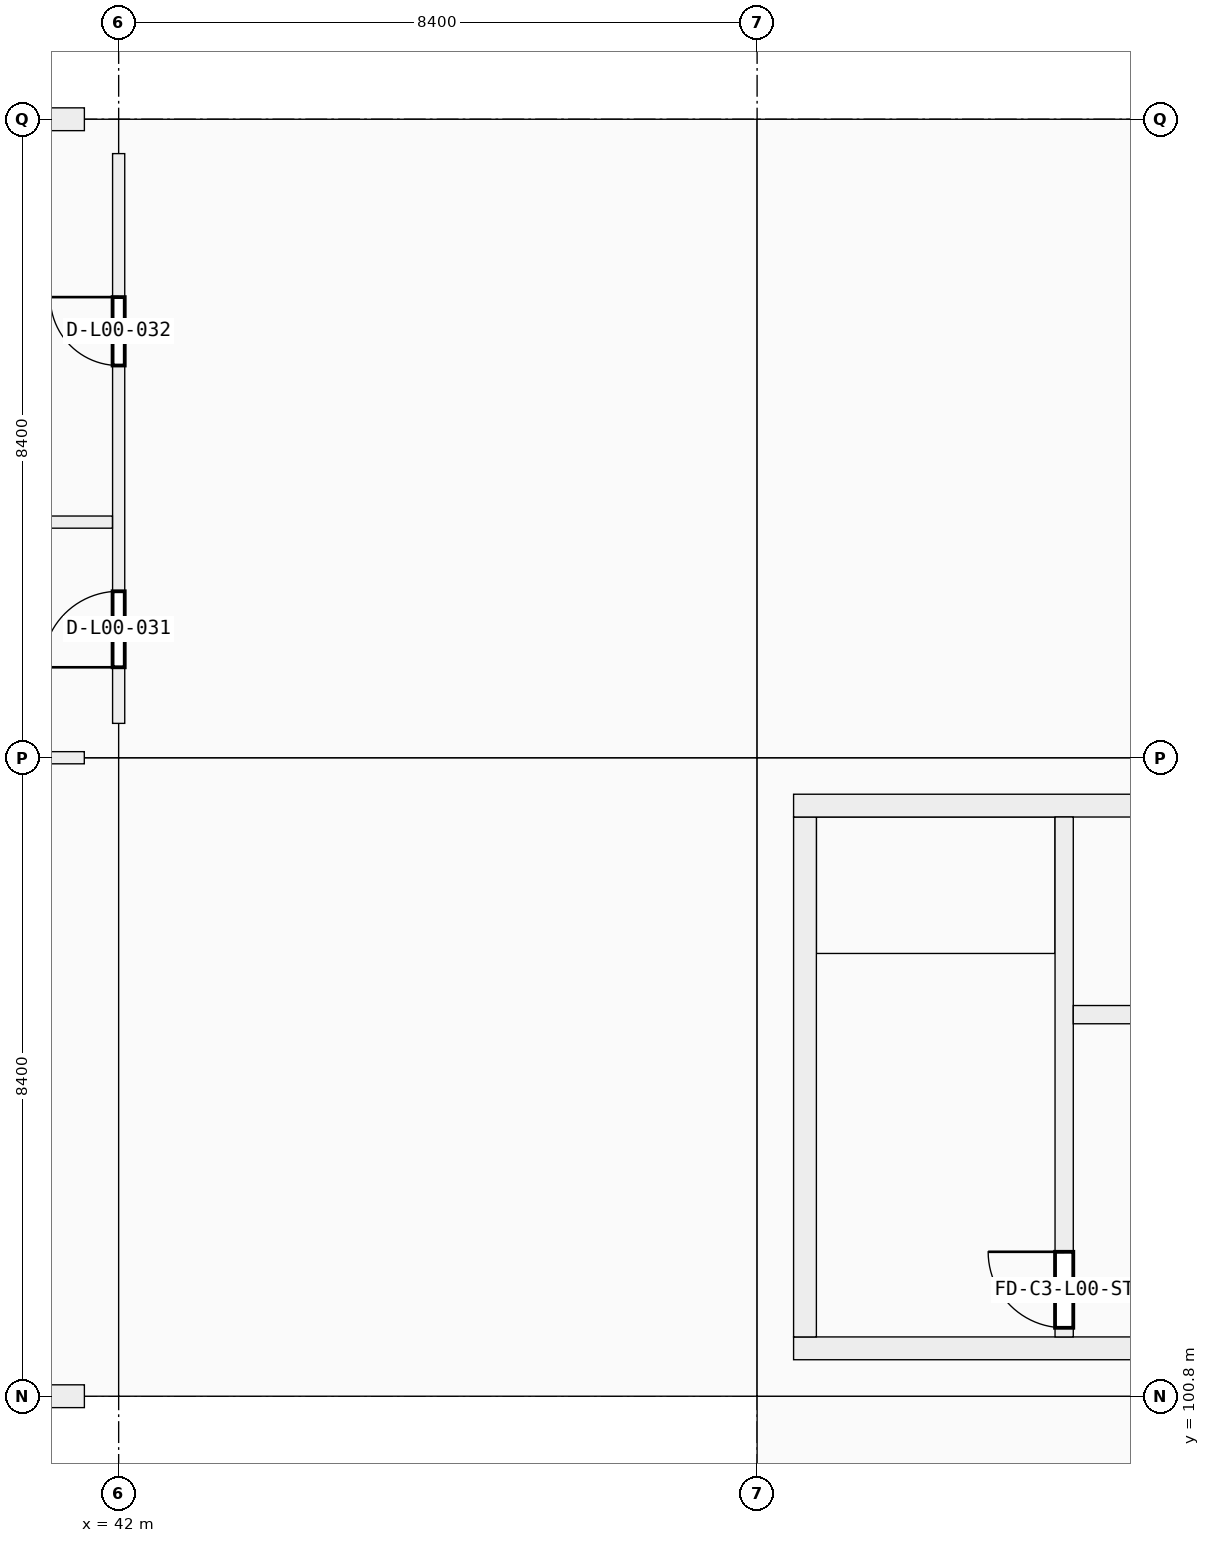
"""IFC4 building model, lengths in metres.
Left out: names, types, materials, properties, quantities, classifications, styles, units other than length and angle.
Written with IfcOpenShell. Run it as: python <this file> out.ifc"""

import sys

from ifc_helpers import new_model, si_unit, direction, frame, frame_2d, origin, origin_2d, place, context, subcontext, project, spatial, rectangle, extrude, element, fill, save


model = new_model("IFC4")
c1 = context("Model", 3, precision=1e-05, world=origin(), true_north=direction((0.0, 1.0)))
c2 = subcontext(c1, "Body", "Model", "MODEL_VIEW")
j1 = project(units=[si_unit("LENGTHUNIT", "METRE"), si_unit("PLANEANGLEUNIT", "RADIAN")], contexts=[c1])
p1 = place(None, origin())
s1 = spatial("IfcSite", under=j1, at=p1, CompositionType="ELEMENT")
p2 = place(p1, origin())
s2 = spatial("IfcBuilding", under=s1, at=p2, CompositionType="ELEMENT")
p3 = place(p2, origin())
s3 = spatial("IfcBuildingStorey", under=s2, at=p3, CompositionType="ELEMENT", Elevation=0.0)
for number, where, z_axis, x_axis in (
    (1, (42.0, 100.8, 0.0), (0.0, 0.0, 1.0), (1.0, 0.0, 0.0)),
    (2, (42.0, 109.2, 0.0), (0.0, 0.0, 1.0), (1.0, 0.0, 0.0)),
    (3, (42.0, 117.6, 0.0), (0.0, 0.0, 1.0), (1.0, 0.0, 0.0)),
    (4, (50.4, 100.8, 0.0), (0.0, 0.0, 1.0), (1.0, 0.0, 0.0)),
    (5, (50.4, 109.2, 0.0), (0.0, 0.0, 1.0), (1.0, 0.0, 0.0)),
    (6, (50.4, 117.6, 0.0), (0.0, 0.0, 1.0), (1.0, 0.0, 0.0)),
):
    element("IfcColumn", number, at=place(p3, frame(where, z_axis=z_axis, x_axis=x_axis)), inside=s3, PredefinedType="COLUMN", context=c2, shape_type="SweptSolid", body=[
        extrude(rectangle(XDim=0.9, YDim=0.9, at=origin_2d()), origin(), (0.0, 0.0, 1.0), 5.76),
    ])
p4 = place(p3, frame((41.549, 100.8, 0.0), z_axis=(0.0, 0.0, 1.0), x_axis=(-1.0, 0.0, 0.0)))
e7 = element("IfcWall", 7, at=p4, inside=s3, PredefinedType="SOLIDWALL", context=c2, shape_type="SweptSolid", body=[
    extrude(rectangle(XDim=7.548, YDim=0.3, at=frame_2d((3.774, 0.0))), origin(), (0.0, 0.0, 1.0), 4.7),
])
p5 = place(p4, frame((2.174, 0.0, 0.9)))
e8 = element("IfcOpeningElement", 8, at=p5, cuts=e7, PredefinedType="OPENING", context=c2, shape_type="SweptSolid", body=[
    extrude(rectangle(XDim=3.2, YDim=1.75, at=frame_2d((1.6, 0.875))), frame((0.0, 0.15, 0.0), z_axis=(0.0, -1.0, 0.0), x_axis=(1.0, 0.0, 0.0)), (0.0, 0.0, 1.0), 0.3),
])
p6 = place(p3, frame((34.001, 117.6, 0.0), z_axis=(0.0, 0.0, 1.0), x_axis=(1.0, 0.0, 0.0)))
e9 = element("IfcWall", 9, at=p6, inside=s3, PredefinedType="SOLIDWALL", context=c2, shape_type="SweptSolid", body=[
    extrude(rectangle(XDim=7.548, YDim=0.3, at=frame_2d((3.774, 0.0))), origin(), (0.0, 0.0, 1.0), 4.7),
])
p7 = place(p6, frame((2.524, 0.0, 0.9)))
e10 = element("IfcOpeningElement", 10, at=p7, cuts=e9, PredefinedType="OPENING", context=c2, shape_type="SweptSolid", body=[
    extrude(rectangle(XDim=2.5, YDim=1.65, at=frame_2d((1.25, 0.825))), frame((0.0, 0.15, 0.0), z_axis=(0.0, -1.0, 0.0), x_axis=(1.0, 0.0, 0.0)), (0.0, 0.0, 1.0), 0.3),
])
p8 = place(p3, frame((58.32, 101.43, 0.0), z_axis=(0.0, 0.0, 1.0), x_axis=(-1.0, 0.0, 0.0)))
e11 = element("IfcWall", 11, at=p8, inside=s3, PredefinedType="SHEAR", context=c2, shape_type="SweptSolid", body=[
    extrude(rectangle(XDim=7.44, YDim=0.3, at=frame_2d((3.72, 0.0))), origin(), (0.0, 0.0, 1.0), 5.76),
])
p9 = place(p8, frame((1.28, 0.0, 0.0)))
e12 = element("IfcOpeningElement", 12, at=p9, cuts=e11, PredefinedType="OPENING", context=c2, shape_type="SweptSolid", body=[
    extrude(rectangle(XDim=1.5, YDim=2.15, at=frame_2d((0.75, 1.075))), frame((0.0, 0.15, 0.0), z_axis=(0.0, -1.0, 0.0), x_axis=(1.0, 0.0, 0.0)), (0.0, 0.0, 1.0), 0.3),
])
p10 = place(p3, frame((51.03, 101.58, 0.0), z_axis=(0.0, 0.0, 1.0), x_axis=(0.0, 1.0, 0.0)))
e13 = element("IfcWall", 13, at=p10, inside=s3, PredefinedType="SHEAR", context=c2, shape_type="SweptSolid", body=[
    extrude(rectangle(XDim=6.84, YDim=0.3, at=frame_2d((3.42, 0.0))), origin(), (0.0, 0.0, 1.0), 5.76),
])
p11 = place(p3, frame((50.88, 108.57, 0.0), z_axis=(0.0, 0.0, 1.0), x_axis=(1.0, 0.0, 0.0)))
e14 = element("IfcWall", 14, at=p11, inside=s3, PredefinedType="SHEAR", context=c2, shape_type="SweptSolid", body=[
    extrude(rectangle(XDim=7.44, YDim=0.3, at=frame_2d((3.72, 0.0))), origin(), (0.0, 0.0, 1.0), 5.76),
])
p12 = place(p3, frame((54.44, 101.58, 0.0), z_axis=(0.0, 0.0, 1.0), x_axis=(0.0, 1.0, 0.0)))
e15 = element("IfcWall", 15, at=p12, inside=s3, PredefinedType="SHEAR", context=c2, shape_type="SweptSolid", body=[
    extrude(rectangle(XDim=6.84, YDim=0.24, at=frame_2d((3.42, 0.0))), origin(), (0.0, 0.0, 1.0), 5.76),
])
p13 = place(p12, frame((0.12, 0.0, 0.0)))
e16 = element("IfcOpeningElement", 16, at=p13, cuts=e15, PredefinedType="OPENING", context=c2, shape_type="SweptSolid", body=[
    extrude(rectangle(XDim=1.0, YDim=2.15, at=frame_2d((0.5, 1.075))), frame((0.0, 0.12, 0.0), z_axis=(0.0, -1.0, 0.0), x_axis=(1.0, 0.0, 0.0)), (0.0, 0.0, 1.0), 0.24),
])
p14 = place(p3, frame((54.56, 105.82, 0.0), z_axis=(0.0, 0.0, 1.0), x_axis=(1.0, 0.0, 0.0)))
e17 = element("IfcWall", 17, at=p14, inside=s3, PredefinedType="SHEAR", context=c2, shape_type="SweptSolid", body=[
    extrude(rectangle(XDim=3.46, YDim=0.24, at=frame_2d((1.73, 0.0))), origin(), (0.0, 0.0, 1.0), 5.76),
])
p15 = place(p14, frame((1.13, 0.0, 0.0)))
e18 = element("IfcOpeningElement", 18, at=p15, cuts=e17, PredefinedType="OPENING", context=c2, shape_type="SweptSolid", body=[
    extrude(rectangle(XDim=1.2, YDim=2.2, at=frame_2d((0.6, 1.1))), frame((0.0, 0.12, 0.0), z_axis=(0.0, -1.0, 0.0), x_axis=(1.0, 0.0, 0.0)), (0.0, 0.0, 1.0), 0.24),
])
p16 = place(p3, frame((34.002, 109.2, 0.0), z_axis=(0.0, 0.0, 1.0), x_axis=(1.0, 0.0, 0.0)))
e19 = element("IfcWall", 19, at=p16, inside=s3, PredefinedType="PARTITIONING", context=c2, shape_type="SweptSolid", body=[
    extrude(rectangle(XDim=7.546, YDim=0.16, at=frame_2d((3.773, 0.0))), origin(), (0.0, 0.0, 1.0), 3.66),
])
p17 = place(p3, frame((42.0, 109.652, 0.0), z_axis=(0.0, 0.0, 1.0), x_axis=(0.0, 1.0, 0.0)))
e20 = element("IfcWall", 20, at=p17, inside=s3, PredefinedType="PARTITIONING", context=c2, shape_type="SweptSolid", body=[
    extrude(rectangle(XDim=7.496, YDim=0.16, at=frame_2d((3.748, 0.0))), origin(), (0.0, 0.0, 1.0), 3.66),
])
p18 = place(p17, frame((0.738, 0.0, 0.0)))
e21 = element("IfcOpeningElement", 21, at=p18, cuts=e20, PredefinedType="OPENING", context=c2, shape_type="SweptSolid", body=[
    extrude(rectangle(XDim=1.0, YDim=2.15, at=frame_2d((0.5, 1.075))), frame((0.0, 0.08, 0.0), z_axis=(0.0, -1.0, 0.0), x_axis=(1.0, 0.0, 0.0)), (0.0, 0.0, 1.0), 0.16),
])
p19 = place(p17, frame((4.708, 0.0, 0.0)))
e22 = element("IfcOpeningElement", 22, at=p19, cuts=e20, PredefinedType="OPENING", context=c2, shape_type="SweptSolid", body=[
    extrude(rectangle(XDim=0.9, YDim=2.05, at=frame_2d((0.45, 1.025))), frame((0.0, 0.08, 0.0), z_axis=(0.0, -1.0, 0.0), x_axis=(1.0, 0.0, 0.0)), (0.0, 0.0, 1.0), 0.16),
])
p20 = place(p3, frame((33.676, 112.3, 0.0), z_axis=(0.0, 0.0, 1.0), x_axis=(1.0, 0.0, 0.0)))
e23 = element("IfcWall", 23, at=p20, inside=s3, PredefinedType="PARTITIONING", context=c2, shape_type="SweptSolid", body=[
    extrude(rectangle(XDim=8.242, YDim=0.16, at=frame_2d((4.121, 0.0))), origin(), (0.0, 0.0, 1.0), 3.66),
])
p21 = place(p13, origin())
e24 = element("IfcDoor", 24, at=p21, inside=s3, OperationType="SINGLE_SWING_RIGHT", PredefinedType="DOOR", context=c2, shape_type="SweptSolid", body=[
    extrude(rectangle(XDim=1.0, YDim=2.15, at=frame_2d((0.5, 1.075))), frame((0.0, 0.025, 0.0), z_axis=(0.0, -1.0, 0.0), x_axis=(1.0, 0.0, 0.0)), (0.0, 0.0, 1.0), 0.05),
])
fill(e16, e24)
p22 = place(p18, origin())
e25 = element("IfcDoor", 25, at=p22, inside=s3, OperationType="SINGLE_SWING_LEFT", PredefinedType="DOOR", context=c2, shape_type="SweptSolid", body=[
    extrude(rectangle(XDim=1.0, YDim=2.15, at=frame_2d((0.5, 1.075))), frame((0.0, 0.025, 0.0), z_axis=(0.0, -1.0, 0.0), x_axis=(1.0, 0.0, 0.0)), (0.0, 0.0, 1.0), 0.05),
])
fill(e21, e25)
p23 = place(p19, origin())
e26 = element("IfcDoor", 26, at=p23, inside=s3, OperationType="SINGLE_SWING_RIGHT", PredefinedType="DOOR", context=c2, shape_type="SweptSolid", body=[
    extrude(rectangle(XDim=0.9, YDim=2.05, at=frame_2d((0.45, 1.025))), frame((0.0, 0.025, 0.0), z_axis=(0.0, -1.0, 0.0), x_axis=(1.0, 0.0, 0.0)), (0.0, 0.0, 1.0), 0.05),
])
fill(e22, e26)
save(model, sys.argv[1])
